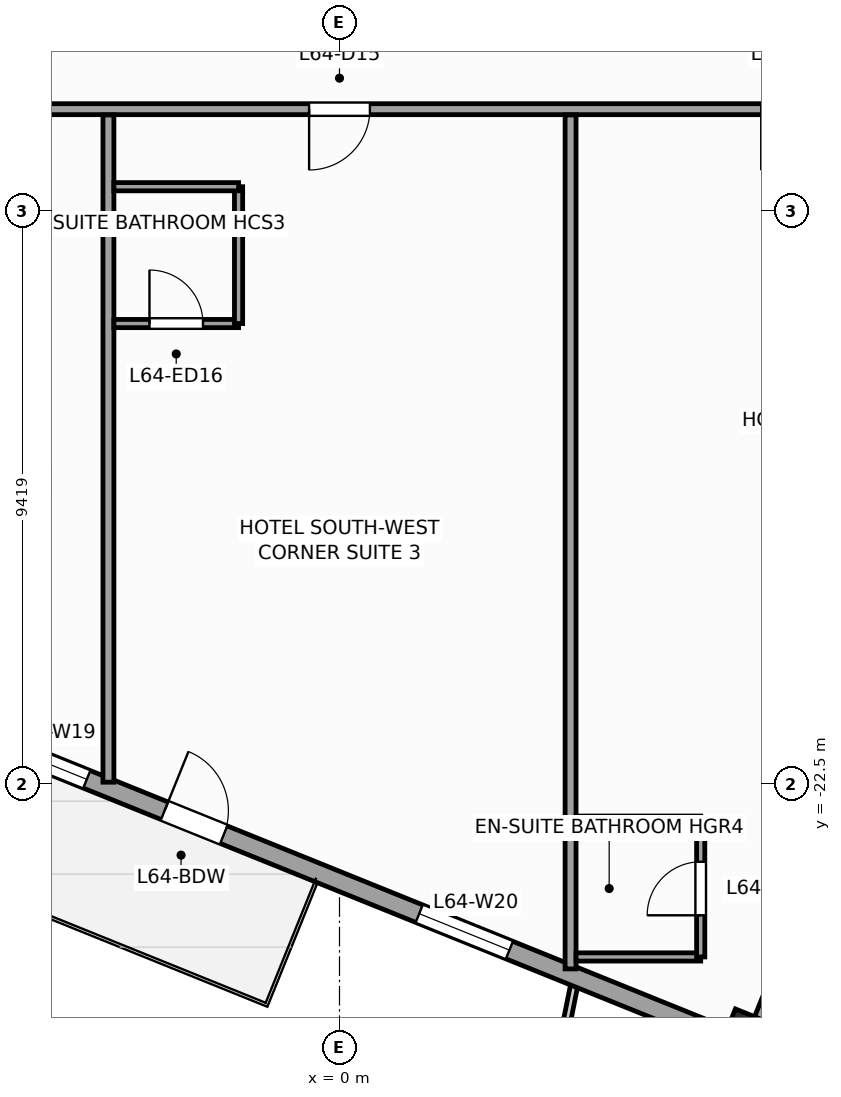
"""IFC4 building model, lengths in metres.
Left out: names, types, materials, properties, quantities, classifications, styles, units other than length and angle.
Written with IfcOpenShell. Run it as: python <this file> out.ifc"""

import sys

from ifc_helpers import new_model, si_unit, direction, frame, frame_2d, origin, origin_2d, place, context, subcontext, project, spatial, rectangle, extrude, source, transform, mapped, element, fill, save


model = new_model("IFC4")
c1 = context("Model", 3, precision=1e-05, world=origin(), true_north=direction((0.0, 1.0)))
c2 = subcontext(c1, "Body", "Model", "MODEL_VIEW")
j1 = project(units=[si_unit("LENGTHUNIT", "METRE"), si_unit("PLANEANGLEUNIT", "RADIAN")], contexts=[c1])
p1 = place(None, origin())
s1 = spatial("IfcSite", under=j1, at=p1, CompositionType="ELEMENT")
p2 = place(p1, origin())
s2 = spatial("IfcBuilding", under=s1, at=p2, CompositionType="ELEMENT")
p3 = place(p2, frame((0.0, 0.0, 265.2)))
s3 = spatial("IfcBuildingStorey", under=s2, at=p3, CompositionType="ELEMENT", Elevation=265.2)
m1 = source(origin(), c2, "Body", "SweptSolid", [
    extrude(rectangle(XDim=0.65, YDim=0.65, at=origin_2d()), origin(), (0.0, 0.0, 1.0), 3.6),
])
p4 = place(p3, frame((6.69, -26.62, 0.0), z_axis=(0.0, 0.0, 1.0), x_axis=(0.374606593416, 0.927183854567, 0.0)))
e1 = element("IfcColumn", 1, at=p4, inside=s3, PredefinedType="COLUMN", context=c2, shape_type="MappedRepresentation", body=[
    mapped(m1, transform((0.0, 0.0, 0.0), scale=1.0)),
])
p5 = place(p3, frame((-23.813, -14.479, 0.0), z_axis=(0.0, 0.0, 1.0), x_axis=(0.927182657188, -0.374609557019, 0.0)))
e2 = element("IfcWall", 2, at=p5, inside=s3, PredefinedType="STANDARD", context=c2, shape_type="SweptSolid", body=[
    extrude(rectangle(XDim=33.31, YDim=0.31, at=frame_2d((16.655, 0.0))), origin(), (0.0, 0.0, 1.0), 2.75),
])
p6 = place(p5, frame((22.58, 0.0, 0.0)))
e3 = element("IfcOpeningElement", 3, at=p6, cuts=e2, PredefinedType="OPENING", context=c2, shape_type="SweptSolid", body=[
    extrude(rectangle(XDim=1.05, YDim=2.25, at=frame_2d((0.525, 1.125))), frame((0.0, 0.165, 0.0), z_axis=(0.0, -1.0, 0.0), x_axis=(1.0, 0.0, 0.0)), (0.0, 0.0, 1.0), 0.33),
])
p7 = place(p5, frame((3.197, 0.0, 0.47)))
e4 = element("IfcOpeningElement", 4, at=p7, cuts=e2, PredefinedType="OPENING", context=c2, shape_type="SweptSolid", body=[
    extrude(rectangle(XDim=1.6, YDim=2.1, at=frame_2d((0.8, 1.05))), frame((0.0, 0.165, 0.0), z_axis=(0.0, -1.0, 0.0), x_axis=(1.0, 0.0, 0.0)), (0.0, 0.0, 1.0), 0.33),
])
p8 = place(p5, frame((8.86, 0.0, 0.47)))
e5 = element("IfcOpeningElement", 5, at=p8, cuts=e2, PredefinedType="OPENING", context=c2, shape_type="SweptSolid", body=[
    extrude(rectangle(XDim=1.6, YDim=2.1, at=frame_2d((0.8, 1.05))), frame((0.0, 0.165, 0.0), z_axis=(0.0, -1.0, 0.0), x_axis=(1.0, 0.0, 0.0)), (0.0, 0.0, 1.0), 0.33),
])
p9 = place(p5, frame((14.439, 0.0, 0.47)))
e6 = element("IfcOpeningElement", 6, at=p9, cuts=e2, PredefinedType="OPENING", context=c2, shape_type="SweptSolid", body=[
    extrude(rectangle(XDim=1.6, YDim=2.1, at=frame_2d((0.8, 1.05))), frame((0.0, 0.165, 0.0), z_axis=(0.0, -1.0, 0.0), x_axis=(1.0, 0.0, 0.0)), (0.0, 0.0, 1.0), 0.33),
])
p10 = place(p5, frame((19.601, 0.0, 0.47)))
e7 = element("IfcOpeningElement", 7, at=p10, cuts=e2, PredefinedType="OPENING", context=c2, shape_type="SweptSolid", body=[
    extrude(rectangle(XDim=1.6, YDim=2.1, at=frame_2d((0.8, 1.05))), frame((0.0, 0.165, 0.0), z_axis=(0.0, -1.0, 0.0), x_axis=(1.0, 0.0, 0.0)), (0.0, 0.0, 1.0), 0.33),
])
p11 = place(p5, frame((27.097, 0.0, 0.47)))
e8 = element("IfcOpeningElement", 8, at=p11, cuts=e2, PredefinedType="OPENING", context=c2, shape_type="SweptSolid", body=[
    extrude(rectangle(XDim=1.6, YDim=2.1, at=frame_2d((0.8, 1.05))), frame((0.0, 0.165, 0.0), z_axis=(0.0, -1.0, 0.0), x_axis=(1.0, 0.0, 0.0)), (0.0, 0.0, 1.0), 0.33),
])
p12 = place(p3, frame((6.784, -26.841, 0.0), z_axis=(0.0, 0.0, 1.0), x_axis=(0.374636620962, 0.927171722085, 0.0)))
e9 = element("IfcWall", 9, at=p12, inside=s3, PredefinedType="STANDARD", context=c2, shape_type="SweptSolid", body=[
    extrude(rectangle(XDim=6.0, YDim=0.31, at=frame_2d((3.0, 0.0))), origin(), (0.0, 0.0, 1.0), 2.65),
])
p13 = place(p3, frame((-10.3, -11.4, 0.0), z_axis=(0.0, 0.0, 1.0), x_axis=(1.0, 0.0, 0.0)))
e10 = element("IfcWall", 10, at=p13, inside=s3, PredefinedType="PARTITIONING", context=c2, shape_type="SweptSolid", body=[
    extrude(rectangle(XDim=21.7, YDim=0.18, at=frame_2d((10.85, 0.0))), origin(), (0.0, 0.0, 1.0), 3.35),
])
p14 = place(p13, frame((1.605, 0.0, 0.0)))
e11 = element("IfcOpeningElement", 11, at=p14, cuts=e10, PredefinedType="OPENING", context=c2, shape_type="SweptSolid", body=[
    extrude(rectangle(XDim=0.95, YDim=2.1, at=frame_2d((0.475, 1.05))), frame((0.0, 0.1, 0.0), z_axis=(0.0, -1.0, 0.0), x_axis=(1.0, 0.0, 0.0)), (0.0, 0.0, 1.0), 0.2),
])
p15 = place(p13, frame((17.236, 0.0, 0.0)))
e12 = element("IfcOpeningElement", 12, at=p15, cuts=e10, PredefinedType="OPENING", context=c2, shape_type="SweptSolid", body=[
    extrude(rectangle(XDim=1.0, YDim=2.15, at=frame_2d((0.5, 1.075))), frame((0.0, 0.1, 0.0), z_axis=(0.0, -1.0, 0.0), x_axis=(1.0, 0.0, 0.0)), (0.0, 0.0, 1.0), 0.2),
])
p16 = place(p13, frame((9.8, 0.0, 0.0)))
e13 = element("IfcOpeningElement", 13, at=p16, cuts=e10, PredefinedType="OPENING", context=c2, shape_type="SweptSolid", body=[
    extrude(rectangle(XDim=1.0, YDim=2.15, at=frame_2d((0.5, 1.075))), frame((0.0, 0.1, 0.0), z_axis=(0.0, -1.0, 0.0), x_axis=(1.0, 0.0, 0.0)), (0.0, 0.0, 1.0), 0.2),
])
p17 = place(p3, frame((3.8, -11.495, 0.0), z_axis=(0.0, 0.0, 1.0), x_axis=(0.0, -1.0, 0.0)))
e14 = element("IfcWall", 14, at=p17, inside=s3, PredefinedType="PARTITIONING", context=c2, shape_type="SweptSolid", body=[
    extrude(rectangle(XDim=14.043, YDim=0.18, at=frame_2d((7.021, 0.0))), origin(), (0.0, 0.0, 1.0), 3.35),
])
p18 = place(p3, frame((-3.8, -11.495, 0.0), z_axis=(0.0, 0.0, 1.0), x_axis=(0.0, -1.0, 0.0)))
e15 = element("IfcWall", 15, at=p18, inside=s3, PredefinedType="PARTITIONING", context=c2, shape_type="SweptSolid", body=[
    extrude(rectangle(XDim=10.972, YDim=0.18, at=frame_2d((5.486, 0.0))), origin(), (0.0, 0.0, 1.0), 3.35),
])
p19 = place(p3, frame((3.89, -25.342, 0.0), z_axis=(0.0, 0.0, 1.0), x_axis=(1.0, 0.0, 0.0)))
e16 = element("IfcWall", 16, at=p19, inside=s3, PredefinedType="PARTITIONING", context=c2, shape_type="SweptSolid", body=[
    extrude(rectangle(XDim=2.05, YDim=0.135, at=frame_2d((1.025, 0.0))), origin(), (0.0, 0.0, 1.0), 2.75),
])
p20 = place(p3, frame((5.94, -25.342, 0.0), z_axis=(0.0, 0.0, 1.0), x_axis=(0.0, 1.0, 0.0)))
e17 = element("IfcWall", 17, at=p20, inside=s3, PredefinedType="PARTITIONING", context=c2, shape_type="SweptSolid", body=[
    extrude(rectangle(XDim=2.25, YDim=0.135, at=frame_2d((1.125, 0.0))), origin(), (0.0, 0.0, 1.0), 3.35),
])
p21 = place(p20, frame((0.685, 0.0, 0.0)))
e18 = element("IfcOpeningElement", 18, at=p21, cuts=e17, PredefinedType="OPENING", context=c2, shape_type="SweptSolid", body=[
    extrude(rectangle(XDim=0.88, YDim=2.1, at=frame_2d((0.44, 1.05))), frame((0.0, 0.078, 0.0), z_axis=(0.0, -1.0, 0.0), x_axis=(1.0, 0.0, 0.0)), (0.0, 0.0, 1.0), 0.155),
])
p22 = place(p3, frame((3.89, -23.092, 0.0), z_axis=(0.0, 0.0, 1.0), x_axis=(1.0, 0.0, 0.0)))
e19 = element("IfcWall", 19, at=p22, inside=s3, PredefinedType="PARTITIONING", context=c2, shape_type="SweptSolid", body=[
    extrude(rectangle(XDim=2.05, YDim=0.135, at=frame_2d((1.025, 0.0))), origin(), (0.0, 0.0, 1.0), 2.95),
])
p23 = place(p3, frame((-3.71, -14.925, 0.0), z_axis=(0.0, 0.0, 1.0), x_axis=(1.0, 0.0, 0.0)))
e20 = element("IfcWall", 20, at=p23, inside=s3, PredefinedType="PARTITIONING", context=c2, shape_type="SweptSolid", body=[
    extrude(rectangle(XDim=2.05, YDim=0.135, at=frame_2d((1.025, 0.0))), origin(), (0.0, 0.0, 1.0), 3.35),
])
p24 = place(p23, frame((0.585, 0.0, 0.0)))
e21 = element("IfcOpeningElement", 21, at=p24, cuts=e20, PredefinedType="OPENING", context=c2, shape_type="SweptSolid", body=[
    extrude(rectangle(XDim=0.88, YDim=2.1, at=frame_2d((0.44, 1.05))), frame((0.0, 0.078, 0.0), z_axis=(0.0, -1.0, 0.0), x_axis=(1.0, 0.0, 0.0)), (0.0, 0.0, 1.0), 0.155),
])
p25 = place(p3, frame((-1.66, -14.925, 0.0), z_axis=(0.0, 0.0, 1.0), x_axis=(0.0, 1.0, 0.0)))
e22 = element("IfcWall", 22, at=p25, inside=s3, PredefinedType="PARTITIONING", context=c2, shape_type="SweptSolid", body=[
    extrude(rectangle(XDim=2.25, YDim=0.135, at=frame_2d((1.125, 0.0))), origin(), (0.0, 0.0, 1.0), 3.35),
])
p26 = place(p3, frame((-3.71, -12.675, 0.0), z_axis=(0.0, 0.0, 1.0), x_axis=(1.0, 0.0, 0.0)))
e23 = element("IfcWall", 23, at=p26, inside=s3, PredefinedType="PARTITIONING", context=c2, shape_type="SweptSolid", body=[
    extrude(rectangle(XDim=2.05, YDim=0.135, at=frame_2d((1.025, 0.0))), origin(), (0.0, 0.0, 1.0), 3.35),
])
m2 = source(origin(), c2, "Body", "SweptSolid", [
    extrude(rectangle(XDim=1.05, YDim=2.25, at=frame_2d((0.525, 1.125))), frame((0.0, 0.025, 0.0), z_axis=(0.0, -1.0, 0.0), x_axis=(1.0, 0.0, 0.0)), (0.0, 0.0, 1.0), 0.05),
])
p27 = place(p6, origin())
e24 = element("IfcDoor", 24, at=p27, inside=s3, OperationType="SINGLE_SWING_LEFT", PredefinedType="DOOR", context=c2, shape_type="MappedRepresentation", body=[
    mapped(m2, transform((0.0, 0.0, 0.0), scale=1.0)),
])
fill(e3, e24)
m3 = source(origin(), c2, "Body", "SweptSolid", [
    extrude(rectangle(XDim=1.6, YDim=2.1, at=frame_2d((0.8, 1.05))), frame((0.0, 0.03, 0.0), z_axis=(0.0, -1.0, 0.0), x_axis=(1.0, 0.0, 0.0)), (0.0, 0.0, 1.0), 0.06),
])
p28 = place(p10, origin())
e25 = element("IfcWindow", 25, at=p28, inside=s3, PartitioningType="SINGLE_PANEL", PredefinedType="WINDOW", context=c2, shape_type="MappedRepresentation", body=[
    mapped(m3, transform((0.0, 0.0, 0.0), scale=1.0)),
])
fill(e7, e25)
p29 = place(p11, origin())
e26 = element("IfcWindow", 26, at=p29, inside=s3, PartitioningType="SINGLE_PANEL", PredefinedType="WINDOW", context=c2, shape_type="MappedRepresentation", body=[
    mapped(m3, transform((0.0, 0.0, 0.0), scale=1.0)),
])
fill(e8, e26)
m4 = source(origin(), c2, "Body", "SweptSolid", [
    extrude(rectangle(XDim=1.0, YDim=2.15, at=frame_2d((0.5, 1.075))), frame((0.0, 0.025, 0.0), z_axis=(0.0, -1.0, 0.0), x_axis=(1.0, 0.0, 0.0)), (0.0, 0.0, 1.0), 0.05),
])
p30 = place(p15, frame((1.0, 0.0, 0.0), z_axis=(0.0, 0.0, 1.0), x_axis=(-1.0, 0.0, 0.0)))
e27 = element("IfcDoor", 27, at=p30, inside=s3, OperationType="SINGLE_SWING_LEFT", PredefinedType="DOOR", context=c2, shape_type="MappedRepresentation", body=[
    mapped(m4, transform((0.0, 0.0, 0.0), scale=1.0)),
])
fill(e12, e27)
m5 = source(origin(), c2, "Body", "SweptSolid", [
    extrude(rectangle(XDim=0.88, YDim=2.1, at=frame_2d((0.44, 1.05))), frame((0.0, 0.025, 0.0), z_axis=(0.0, -1.0, 0.0), x_axis=(1.0, 0.0, 0.0)), (0.0, 0.0, 1.0), 0.05),
])
p31 = place(p21, origin())
e28 = element("IfcDoor", 28, at=p31, inside=s3, OperationType="SINGLE_SWING_LEFT", PredefinedType="DOOR", context=c2, shape_type="MappedRepresentation", body=[
    mapped(m5, transform((0.0, 0.0, 0.0), scale=1.0)),
])
fill(e18, e28)
p32 = place(p16, frame((1.0, 0.0, 0.0), z_axis=(0.0, 0.0, 1.0), x_axis=(-1.0, 0.0, 0.0)))
e29 = element("IfcDoor", 29, at=p32, inside=s3, OperationType="SINGLE_SWING_LEFT", PredefinedType="DOOR", context=c2, shape_type="MappedRepresentation", body=[
    mapped(m4, transform((0.0, 0.0, 0.0), scale=1.0)),
])
fill(e13, e29)
p33 = place(p24, origin())
e30 = element("IfcDoor", 30, at=p33, inside=s3, OperationType="SINGLE_SWING_LEFT", PredefinedType="DOOR", context=c2, shape_type="MappedRepresentation", body=[
    mapped(m5, transform((0.0, 0.0, 0.0), scale=1.0)),
])
fill(e21, e30)
save(model, sys.argv[1])
